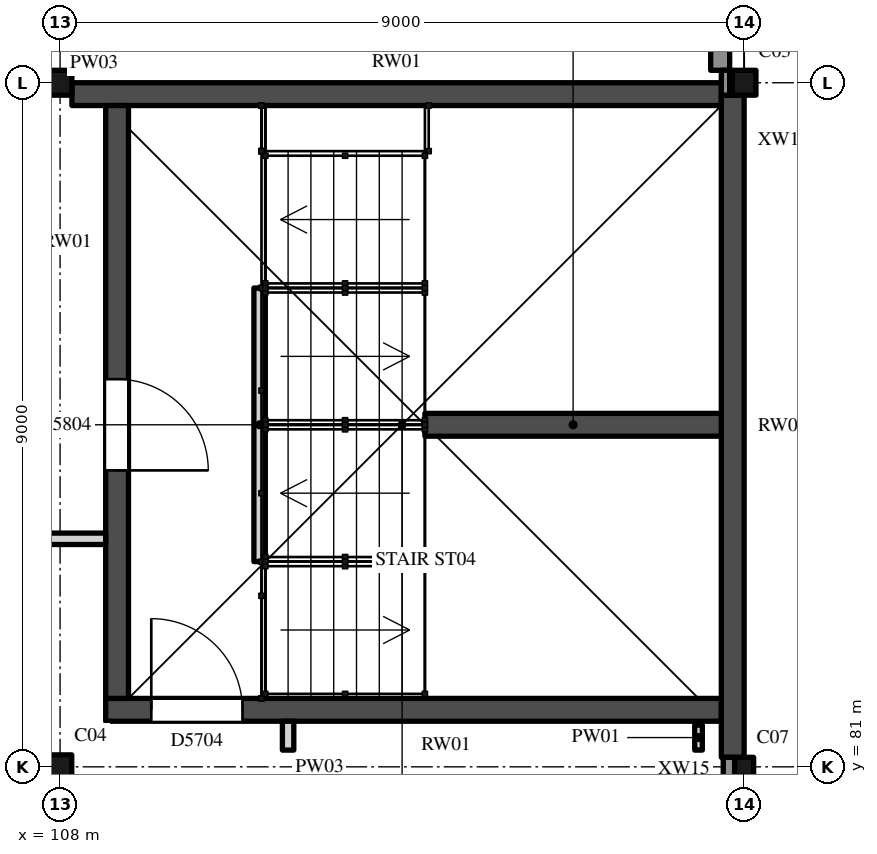
"""IFC4 building model, lengths in metres.
Left out: names, types, materials, properties, quantities, classifications, styles, units other than length and angle.
Written with IfcOpenShell. Run it as: python <this file> out.ifc"""

import sys

from ifc_helpers import new_model, si_unit, direction, frame, frame_2d, origin, origin_2d, place, context, subcontext, project, spatial, rectangle, hollow_rectangle, i_section, extrude, element, fill, save


model = new_model("IFC4")
c1 = context("Model", 3, precision=1e-05, world=origin(), true_north=direction((0.0, 1.0)))
c2 = subcontext(c1, "Body", "Model", "MODEL_VIEW")
j1 = project(units=[si_unit("LENGTHUNIT", "METRE"), si_unit("PLANEANGLEUNIT", "RADIAN")], contexts=[c1])
p1 = place(None, origin())
s1 = spatial("IfcSite", under=j1, at=p1, CompositionType="ELEMENT")
p2 = place(p1, origin())
s2 = spatial("IfcBuilding", under=s1, at=p2, CompositionType="ELEMENT")
p3 = place(p2, frame((0.0, 0.0, 31.0)))
s3 = spatial("IfcBuildingStorey", under=s2, at=p3, CompositionType="ELEMENT", Elevation=31.0)
p4 = place(p3, frame((108.0, 81.0, 0.0), z_axis=(0.0, 0.0, 1.0), x_axis=(1.0, 0.0, 0.0)))
e1 = element("IfcColumn", 1, at=p4, inside=s3, PredefinedType="COLUMN", context=c2, shape_type="SweptSolid", body=[
    extrude(i_section(OverallWidth=0.307, OverallDepth=0.315, WebThickness=0.012, FlangeThickness=0.019, FilletRadius=0.017, at=origin_2d()), origin(), (0.0, 0.0, 1.0), 5.0),
])
p5 = place(p3, frame((117.0, 81.0, 0.0), z_axis=(0.0, 0.0, 1.0), x_axis=(1.0, 0.0, 0.0)))
e2 = element("IfcColumn", 2, at=p5, inside=s3, PredefinedType="COLUMN", context=c2, shape_type="SweptSolid", body=[
    extrude(hollow_rectangle(XDim=0.25, YDim=0.25, WallThickness=0.009, InnerFilletRadius=0.013, OuterFilletRadius=0.022, at=origin_2d()), origin(), (0.0, 0.0, 1.0), 5.0),
])
for number, where, z_axis, x_axis in (
    (3, (108.0, 90.0, 0.0), (0.0, 0.0, 1.0), (1.0, 0.0, 0.0)),
    (4, (117.0, 90.0, 0.0), (0.0, 0.0, 1.0), (1.0, 0.0, 0.0)),
):
    element("IfcColumn", number, at=place(p3, frame(where, z_axis=z_axis, x_axis=x_axis)), inside=s3, PredefinedType="COLUMN", context=c2, shape_type="SweptSolid", body=[
        extrude(i_section(OverallWidth=0.311, OverallDepth=0.327, WebThickness=0.016, FlangeThickness=0.025, FilletRadius=0.017, at=origin_2d()), origin(), (0.0, 0.0, 1.0), 5.0),
    ])
p6 = place(p3, frame((108.6, 81.75, 0.0), z_axis=(0.0, 0.0, 1.0), x_axis=(1.0, 0.0, 0.0)))
e5 = element("IfcWall", 5, at=p6, inside=s3, PredefinedType="SHEAR", context=c2, shape_type="SweptSolid", body=[
    extrude(rectangle(XDim=8.1, YDim=0.3, at=frame_2d((4.05, 0.0))), origin(), (0.0, 0.0, 1.0), 5.0),
])
p7 = place(p6, frame((0.6, 0.0, 0.0)))
e6 = element("IfcOpeningElement", 6, at=p7, cuts=e5, PredefinedType="OPENING", context=c2, shape_type="SweptSolid", body=[
    extrude(rectangle(XDim=1.2, YDim=2.1, at=frame_2d((0.6, 1.05))), frame((0.0, 0.16, 0.0), z_axis=(0.0, -1.0, 0.0), x_axis=(1.0, 0.0, 0.0)), (0.0, 0.0, 1.0), 0.32),
])
p8 = place(p3, frame((108.156, 89.85, 0.0), z_axis=(0.0, 0.0, 1.0), x_axis=(1.0, 0.0, 0.0)))
e7 = element("IfcWall", 7, at=p8, inside=s3, PredefinedType="SHEAR", context=c2, shape_type="SweptSolid", body=[
    extrude(rectangle(XDim=8.544, YDim=0.3, at=frame_2d((4.272, 0.0))), origin(), (0.0, 0.0, 1.0), 5.0),
])
p9 = place(p3, frame((108.75, 81.9, 0.0), z_axis=(0.0, 0.0, 1.0), x_axis=(0.0, 1.0, 0.0)))
e8 = element("IfcWall", 8, at=p9, inside=s3, PredefinedType="SHEAR", context=c2, shape_type="SweptSolid", body=[
    extrude(rectangle(XDim=7.8, YDim=0.3, at=frame_2d((3.9, 0.0))), origin(), (0.0, 0.0, 1.0), 5.0),
])
p10 = place(p9, frame((3.0, 0.0, 0.0)))
e9 = element("IfcOpeningElement", 9, at=p10, cuts=e8, PredefinedType="OPENING", context=c2, shape_type="SweptSolid", body=[
    extrude(rectangle(XDim=1.2, YDim=2.1, at=frame_2d((0.6, 1.05))), frame((0.0, 0.16, 0.0), z_axis=(0.0, -1.0, 0.0), x_axis=(1.0, 0.0, 0.0)), (0.0, 0.0, 1.0), 0.32),
])
p11 = place(p3, frame((116.85, 81.125, 0.0), z_axis=(0.0, 0.0, 1.0), x_axis=(0.0, 1.0, 0.0)))
e10 = element("IfcWall", 10, at=p11, inside=s3, PredefinedType="SHEAR", context=c2, shape_type="SweptSolid", body=[
    extrude(rectangle(XDim=8.711, YDim=0.3, at=frame_2d((4.356, 0.0))), origin(), (0.0, 0.0, 1.0), 5.0),
])
p12 = place(p3, frame((112.8, 85.5, 0.0), z_axis=(0.0, 0.0, 1.0), x_axis=(1.0, 0.0, 0.0)))
e11 = element("IfcWall", 11, at=p12, inside=s3, PredefinedType="SHEAR", context=c2, shape_type="SweptSolid", body=[
    extrude(rectangle(XDim=3.9, YDim=0.3, at=frame_2d((1.95, 0.0))), origin(), (0.0, 0.0, 1.0), 5.0),
])
p13 = place(p3, frame((110.625, 83.7, 0.0), z_axis=(0.0, 0.0, 1.0), x_axis=(0.0, 1.0, 0.0)))
e12 = element("IfcWall", 12, at=p13, inside=s3, PredefinedType="STANDARD", context=c2, shape_type="SweptSolid", body=[
    extrude(rectangle(XDim=3.6, YDim=0.15, at=frame_2d((1.8, 0.0))), origin(), (0.0, 0.0, 1.0), 2.3),
])
p14 = place(p3, frame((116.685, 90.164, 0.0), z_axis=(0.0, 0.0, 1.0), x_axis=(0.0, 1.0, 0.0)))
e13 = element("IfcWall", 13, at=p14, inside=s3, PredefinedType="SOLIDWALL", context=c2, shape_type="SweptSolid", body=[
    extrude(rectangle(XDim=8.676, YDim=0.25, at=frame_2d((4.338, 0.0))), origin(), (0.0, 0.0, 1.0), 4.504),
])
p15 = place(p14, frame((0.586, 0.0, 1.6)))
e14 = element("IfcOpeningElement", 14, at=p15, cuts=e13, PredefinedType="OPENING", context=c2, shape_type="SweptSolid", body=[
    extrude(rectangle(XDim=0.6, YDim=1.2, at=frame_2d((0.3, 0.6))), frame((0.0, 0.135, 0.0), z_axis=(0.0, -1.0, 0.0), x_axis=(1.0, 0.0, 0.0)), (0.0, 0.0, 1.0), 0.27),
])
p16 = place(p14, frame((2.992, 0.0, 1.6)))
e15 = element("IfcOpeningElement", 15, at=p16, cuts=e13, PredefinedType="OPENING", context=c2, shape_type="SweptSolid", body=[
    extrude(rectangle(XDim=2.7, YDim=1.2, at=frame_2d((1.35, 0.6))), frame((0.0, 0.135, 0.0), z_axis=(0.0, -1.0, 0.0), x_axis=(1.0, 0.0, 0.0)), (0.0, 0.0, 1.0), 0.27),
])
p17 = place(p14, frame((7.486, 0.0, 1.6)))
e16 = element("IfcOpeningElement", 16, at=p17, cuts=e13, PredefinedType="OPENING", context=c2, shape_type="SweptSolid", body=[
    extrude(rectangle(XDim=0.6, YDim=1.2, at=frame_2d((0.3, 0.6))), frame((0.0, 0.135, 0.0), z_axis=(0.0, -1.0, 0.0), x_axis=(1.0, 0.0, 0.0)), (0.0, 0.0, 1.0), 0.27),
])
p18 = place(p3, frame((116.8, 80.803, 0.0), z_axis=(0.0, 0.0, 1.0), x_axis=(0.0, 1.0, 0.0)))
e17 = element("IfcWall", 17, at=p18, inside=s3, PredefinedType="SOLIDWALL", context=c2, shape_type="SweptSolid", body=[
    extrude(rectangle(XDim=0.322, YDim=0.15, at=frame_2d((0.161, 0.0))), origin(), (0.0, 0.0, 1.0), 5.0),
])
p19 = place(p3, frame((116.755, 89.836, 0.0), z_axis=(0.0, 0.0, 1.0), x_axis=(0.0, 1.0, 0.0)))
e18 = element("IfcWall", 18, at=p19, inside=s3, PredefinedType="SOLIDWALL", context=c2, shape_type="SweptSolid", body=[
    extrude(rectangle(XDim=0.327, YDim=0.11, at=frame_2d((0.164, 0.0))), origin(), (0.0, 0.0, 1.0), 5.0),
])
p20 = place(p2, frame((0.0, 0.0, 16.0)))
s4 = spatial("IfcBuildingStorey", under=s2, at=p20, CompositionType="ELEMENT", Elevation=16.0)
p21 = place(p20, frame((117.15, 81.0, 16.0), z_axis=(0.0, 0.0, 1.0), x_axis=(1.0, 0.0, 0.0)))
e19 = element("IfcWall", 19, at=p21, inside=s4, PredefinedType="SOLIDWALL", context=c2, shape_type="SweptSolid", body=[
    extrude(rectangle(XDim=53.7, YDim=0.3, at=frame_2d((26.85, 0.0))), origin(), (0.0, 0.0, 1.0), 0.9),
])
p22 = place(p21, frame((0.15, 0.0, 0.15)))
e20 = element("IfcOpeningElement", 20, at=p22, cuts=e19, PredefinedType="OPENING", context=c2, shape_type="SweptSolid", body=[
    extrude(rectangle(XDim=2.4, YDim=0.6, at=frame_2d((1.2, 0.3))), frame((0.0, 0.16, 0.0), z_axis=(0.0, -1.0, 0.0), x_axis=(1.0, 0.0, 0.0)), (0.0, 0.0, 1.0), 0.32),
])
p23 = place(p21, frame((3.15, 0.0, 0.15)))
e21 = element("IfcOpeningElement", 21, at=p23, cuts=e19, PredefinedType="OPENING", context=c2, shape_type="SweptSolid", body=[
    extrude(rectangle(XDim=2.4, YDim=0.6, at=frame_2d((1.2, 0.3))), frame((0.0, 0.16, 0.0), z_axis=(0.0, -1.0, 0.0), x_axis=(1.0, 0.0, 0.0)), (0.0, 0.0, 1.0), 0.32),
])
p24 = place(p21, frame((6.15, 0.0, 0.15)))
e22 = element("IfcOpeningElement", 22, at=p24, cuts=e19, PredefinedType="OPENING", context=c2, shape_type="SweptSolid", body=[
    extrude(rectangle(XDim=2.4, YDim=0.6, at=frame_2d((1.2, 0.3))), frame((0.0, 0.16, 0.0), z_axis=(0.0, -1.0, 0.0), x_axis=(1.0, 0.0, 0.0)), (0.0, 0.0, 1.0), 0.32),
])
p25 = place(p21, frame((9.15, 0.0, 0.15)))
e23 = element("IfcOpeningElement", 23, at=p25, cuts=e19, PredefinedType="OPENING", context=c2, shape_type="SweptSolid", body=[
    extrude(rectangle(XDim=2.4, YDim=0.6, at=frame_2d((1.2, 0.3))), frame((0.0, 0.16, 0.0), z_axis=(0.0, -1.0, 0.0), x_axis=(1.0, 0.0, 0.0)), (0.0, 0.0, 1.0), 0.32),
])
p26 = place(p21, frame((12.15, 0.0, 0.15)))
e24 = element("IfcOpeningElement", 24, at=p26, cuts=e19, PredefinedType="OPENING", context=c2, shape_type="SweptSolid", body=[
    extrude(rectangle(XDim=2.4, YDim=0.6, at=frame_2d((1.2, 0.3))), frame((0.0, 0.16, 0.0), z_axis=(0.0, -1.0, 0.0), x_axis=(1.0, 0.0, 0.0)), (0.0, 0.0, 1.0), 0.32),
])
p27 = place(p21, frame((15.15, 0.0, 0.15)))
e25 = element("IfcOpeningElement", 25, at=p27, cuts=e19, PredefinedType="OPENING", context=c2, shape_type="SweptSolid", body=[
    extrude(rectangle(XDim=2.4, YDim=0.6, at=frame_2d((1.2, 0.3))), frame((0.0, 0.16, 0.0), z_axis=(0.0, -1.0, 0.0), x_axis=(1.0, 0.0, 0.0)), (0.0, 0.0, 1.0), 0.32),
])
p28 = place(p21, frame((18.15, 0.0, 0.15)))
e26 = element("IfcOpeningElement", 26, at=p28, cuts=e19, PredefinedType="OPENING", context=c2, shape_type="SweptSolid", body=[
    extrude(rectangle(XDim=2.4, YDim=0.6, at=frame_2d((1.2, 0.3))), frame((0.0, 0.16, 0.0), z_axis=(0.0, -1.0, 0.0), x_axis=(1.0, 0.0, 0.0)), (0.0, 0.0, 1.0), 0.32),
])
p29 = place(p21, frame((21.15, 0.0, 0.15)))
e27 = element("IfcOpeningElement", 27, at=p29, cuts=e19, PredefinedType="OPENING", context=c2, shape_type="SweptSolid", body=[
    extrude(rectangle(XDim=2.4, YDim=0.6, at=frame_2d((1.2, 0.3))), frame((0.0, 0.16, 0.0), z_axis=(0.0, -1.0, 0.0), x_axis=(1.0, 0.0, 0.0)), (0.0, 0.0, 1.0), 0.32),
])
p30 = place(p21, frame((24.15, 0.0, 0.15)))
e28 = element("IfcOpeningElement", 28, at=p30, cuts=e19, PredefinedType="OPENING", context=c2, shape_type="SweptSolid", body=[
    extrude(rectangle(XDim=2.4, YDim=0.6, at=frame_2d((1.2, 0.3))), frame((0.0, 0.16, 0.0), z_axis=(0.0, -1.0, 0.0), x_axis=(1.0, 0.0, 0.0)), (0.0, 0.0, 1.0), 0.32),
])
p31 = place(p21, frame((27.15, 0.0, 0.15)))
e29 = element("IfcOpeningElement", 29, at=p31, cuts=e19, PredefinedType="OPENING", context=c2, shape_type="SweptSolid", body=[
    extrude(rectangle(XDim=2.4, YDim=0.6, at=frame_2d((1.2, 0.3))), frame((0.0, 0.16, 0.0), z_axis=(0.0, -1.0, 0.0), x_axis=(1.0, 0.0, 0.0)), (0.0, 0.0, 1.0), 0.32),
])
p32 = place(p21, frame((30.15, 0.0, 0.15)))
e30 = element("IfcOpeningElement", 30, at=p32, cuts=e19, PredefinedType="OPENING", context=c2, shape_type="SweptSolid", body=[
    extrude(rectangle(XDim=2.4, YDim=0.6, at=frame_2d((1.2, 0.3))), frame((0.0, 0.16, 0.0), z_axis=(0.0, -1.0, 0.0), x_axis=(1.0, 0.0, 0.0)), (0.0, 0.0, 1.0), 0.32),
])
p33 = place(p21, frame((33.15, 0.0, 0.15)))
e31 = element("IfcOpeningElement", 31, at=p33, cuts=e19, PredefinedType="OPENING", context=c2, shape_type="SweptSolid", body=[
    extrude(rectangle(XDim=2.4, YDim=0.6, at=frame_2d((1.2, 0.3))), frame((0.0, 0.16, 0.0), z_axis=(0.0, -1.0, 0.0), x_axis=(1.0, 0.0, 0.0)), (0.0, 0.0, 1.0), 0.32),
])
p34 = place(p21, frame((36.15, 0.0, 0.15)))
e32 = element("IfcOpeningElement", 32, at=p34, cuts=e19, PredefinedType="OPENING", context=c2, shape_type="SweptSolid", body=[
    extrude(rectangle(XDim=2.4, YDim=0.6, at=frame_2d((1.2, 0.3))), frame((0.0, 0.16, 0.0), z_axis=(0.0, -1.0, 0.0), x_axis=(1.0, 0.0, 0.0)), (0.0, 0.0, 1.0), 0.32),
])
p35 = place(p21, frame((39.15, 0.0, 0.15)))
e33 = element("IfcOpeningElement", 33, at=p35, cuts=e19, PredefinedType="OPENING", context=c2, shape_type="SweptSolid", body=[
    extrude(rectangle(XDim=2.4, YDim=0.6, at=frame_2d((1.2, 0.3))), frame((0.0, 0.16, 0.0), z_axis=(0.0, -1.0, 0.0), x_axis=(1.0, 0.0, 0.0)), (0.0, 0.0, 1.0), 0.32),
])
p36 = place(p21, frame((42.15, 0.0, 0.15)))
e34 = element("IfcOpeningElement", 34, at=p36, cuts=e19, PredefinedType="OPENING", context=c2, shape_type="SweptSolid", body=[
    extrude(rectangle(XDim=2.4, YDim=0.6, at=frame_2d((1.2, 0.3))), frame((0.0, 0.16, 0.0), z_axis=(0.0, -1.0, 0.0), x_axis=(1.0, 0.0, 0.0)), (0.0, 0.0, 1.0), 0.32),
])
p37 = place(p21, frame((45.15, 0.0, 0.15)))
e35 = element("IfcOpeningElement", 35, at=p37, cuts=e19, PredefinedType="OPENING", context=c2, shape_type="SweptSolid", body=[
    extrude(rectangle(XDim=2.4, YDim=0.6, at=frame_2d((1.2, 0.3))), frame((0.0, 0.16, 0.0), z_axis=(0.0, -1.0, 0.0), x_axis=(1.0, 0.0, 0.0)), (0.0, 0.0, 1.0), 0.32),
])
p38 = place(p21, frame((48.15, 0.0, 0.15)))
e36 = element("IfcOpeningElement", 36, at=p38, cuts=e19, PredefinedType="OPENING", context=c2, shape_type="SweptSolid", body=[
    extrude(rectangle(XDim=2.4, YDim=0.6, at=frame_2d((1.2, 0.3))), frame((0.0, 0.16, 0.0), z_axis=(0.0, -1.0, 0.0), x_axis=(1.0, 0.0, 0.0)), (0.0, 0.0, 1.0), 0.32),
])
p39 = place(p21, frame((51.15, 0.0, 0.15)))
e37 = element("IfcOpeningElement", 37, at=p39, cuts=e19, PredefinedType="OPENING", context=c2, shape_type="SweptSolid", body=[
    extrude(rectangle(XDim=2.4, YDim=0.6, at=frame_2d((1.2, 0.3))), frame((0.0, 0.16, 0.0), z_axis=(0.0, -1.0, 0.0), x_axis=(1.0, 0.0, 0.0)), (0.0, 0.0, 1.0), 0.32),
])
p40 = place(p3, frame((104.725, 84.0, 0.0), z_axis=(0.0, 0.0, 1.0), x_axis=(1.0, 0.0, 0.0)))
e38 = element("IfcWall", 38, at=p40, inside=s3, PredefinedType="PARTITIONING", context=c2, shape_type="SweptSolid", body=[
    extrude(rectangle(XDim=3.875, YDim=0.15, at=frame_2d((1.938, 0.0))), origin(), (0.0, 0.0, 1.0), 4.521),
])
p41 = place(p3, frame((111.0, 81.22, 0.0), z_axis=(0.0, 0.0, 1.0), x_axis=(0.0, 1.0, 0.0)))
e39 = element("IfcWall", 39, at=p41, inside=s3, PredefinedType="PARTITIONING", context=c2, shape_type="SweptSolid", body=[
    extrude(rectangle(XDim=0.38, YDim=0.15, at=frame_2d((0.19, 0.0))), origin(), (0.0, 0.0, 1.0), 4.825),
])
p42 = place(p3, frame((116.4, 81.22, 0.0), z_axis=(0.0, 0.0, 1.0), x_axis=(0.0, 1.0, 0.0)))
e40 = element("IfcWall", 40, at=p42, inside=s3, PredefinedType="PARTITIONING", context=c2, shape_type="SweptSolid", body=[
    extrude(rectangle(XDim=0.33, YDim=0.1, at=frame_2d((0.165, 0.0))), origin(), (0.0, 0.0, 1.0), 4.825),
])
p43 = place(p10, origin())
e41 = element("IfcDoor", 41, at=p43, inside=s3, OperationType="SINGLE_SWING_LEFT", PredefinedType="DOOR", context=c2, shape_type="SweptSolid", body=[
    extrude(rectangle(XDim=1.2, YDim=2.1, at=frame_2d((0.6, 1.05))), frame((0.0, 0.025, 0.0), z_axis=(0.0, -1.0, 0.0), x_axis=(1.0, 0.0, 0.0)), (0.0, 0.0, 1.0), 0.05),
])
fill(e9, e41)
p44 = place(p7, origin())
e42 = element("IfcDoor", 42, at=p44, inside=s3, OperationType="SINGLE_SWING_RIGHT", PredefinedType="DOOR", context=c2, shape_type="SweptSolid", body=[
    extrude(rectangle(XDim=1.2, YDim=2.1, at=frame_2d((0.6, 1.05))), frame((0.0, 0.025, 0.0), z_axis=(0.0, -1.0, 0.0), x_axis=(1.0, 0.0, 0.0)), (0.0, 0.0, 1.0), 0.05),
])
fill(e6, e42)
save(model, sys.argv[1])
